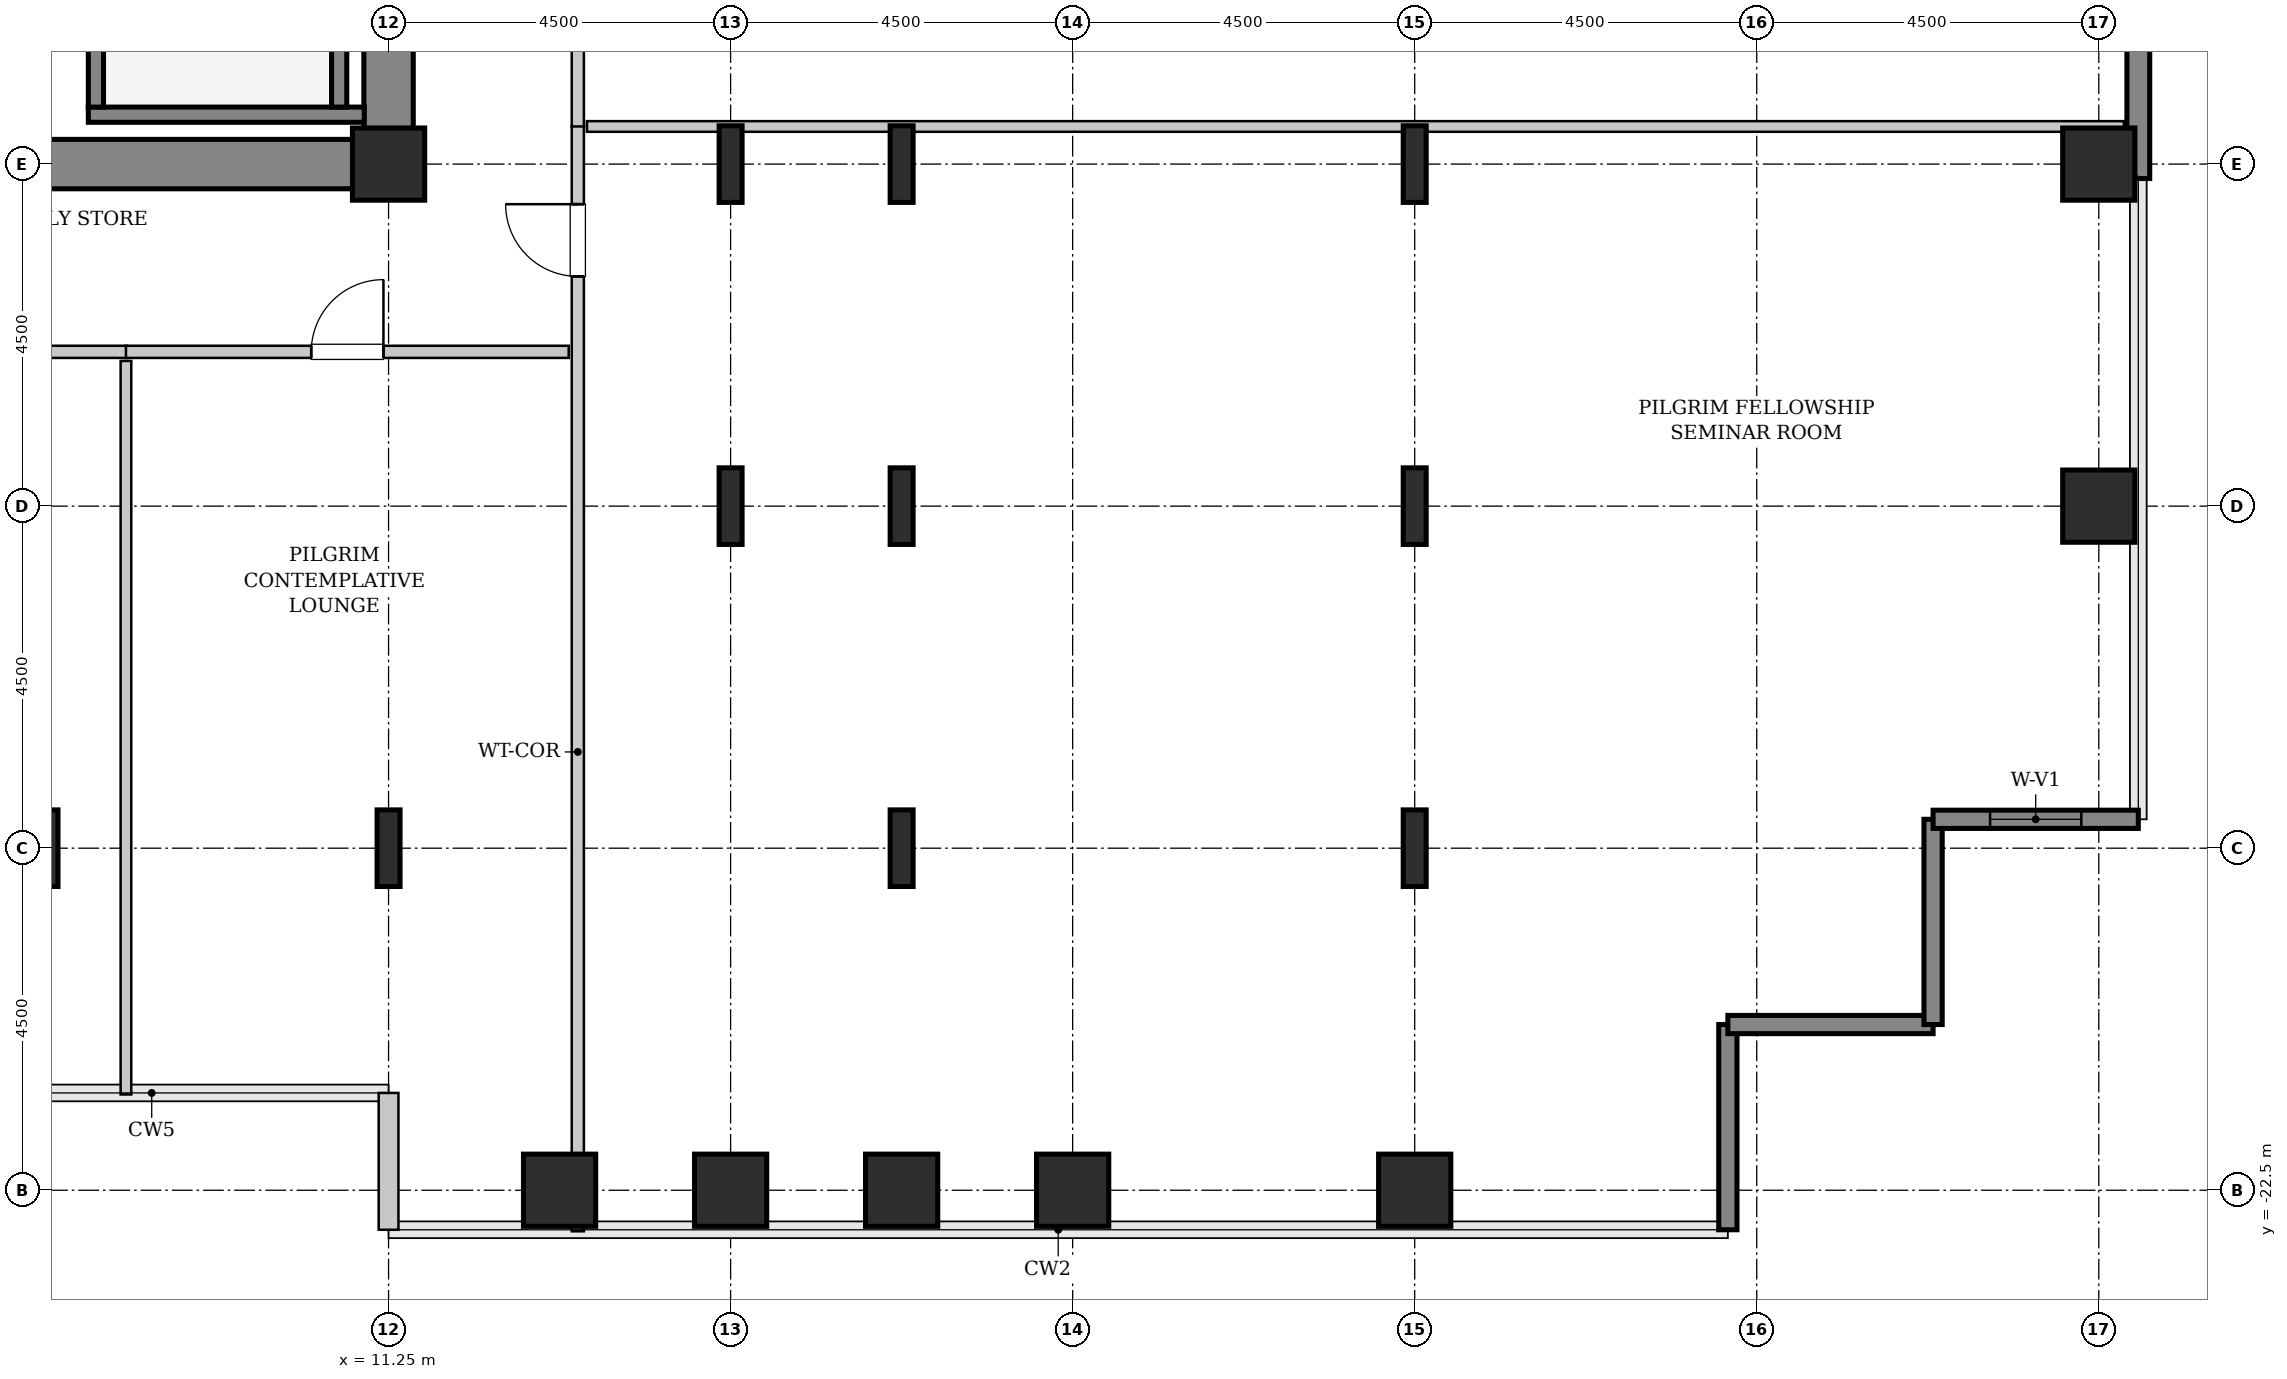
"""IFC4 building model, lengths in metres.
Left out: names, types, materials, properties, quantities, classifications, styles, units other than length and angle.
Written with IfcOpenShell. Run it as: python <this file> out.ifc"""

import sys

from ifc_helpers import new_model, si_unit, direction, frame, frame_2d, origin, origin_2d, place, context, subcontext, project, spatial, rectangle, hollow_rectangle, i_section, extrude, source, transform, mapped, element, fill, save


model = new_model("IFC4")
c1 = context("Model", 3, precision=1e-05, world=origin(), true_north=direction((0.0, 1.0)))
c2 = subcontext(c1, "Body", "Model", "MODEL_VIEW")
j1 = project(units=[si_unit("LENGTHUNIT", "METRE"), si_unit("PLANEANGLEUNIT", "RADIAN")], contexts=[c1])
p1 = place(None, origin())
s1 = spatial("IfcSite", under=j1, at=p1, CompositionType="ELEMENT")
p2 = place(p1, origin())
s2 = spatial("IfcBuilding", under=s1, at=p2, CompositionType="ELEMENT")
p3 = place(p2, frame((0.0, 0.0, 55.8)))
s3 = spatial("IfcBuildingStorey", under=s2, at=p3, CompositionType="ELEMENT", Elevation=55.8)
m1 = source(origin(), c2, "Body", "SweptSolid", [
    extrude(rectangle(XDim=10.025, YDim=0.65, at=frame_2d((5.012, 0.0))), origin(), (0.0, 0.0, 1.0), 3.8),
])
p4 = place(p3, frame((1.55, -9.0, 0.0), z_axis=(0.0, 0.0, 1.0), x_axis=(1.0, 0.0, 0.0)))
e1 = element("IfcWall", 1, at=p4, inside=s3, PredefinedType="SHEAR", context=c2, shape_type="MappedRepresentation", body=[
    mapped(m1, transform((0.0, 0.0, 0.0), x_axis=(1.0, 0.0, 0.0), y_axis=(0.0, 1.0, 0.0), z_axis=(0.0, 0.0, 1.0), scale=1.0)),
])
m2 = source(origin(), c2, "Body", "SweptSolid", [
    extrude(rectangle(XDim=7.325, YDim=0.65, at=frame_2d((3.663, 0.0))), origin(), (0.0, 0.0, 1.0), 3.8),
])
p5 = place(p3, frame((11.25, -8.675, 0.0), z_axis=(0.0, 0.0, 1.0), x_axis=(0.0, 1.0, 0.0)))
e2 = element("IfcWall", 2, at=p5, inside=s3, PredefinedType="SHEAR", context=c2, shape_type="MappedRepresentation", body=[
    mapped(m2, transform((0.0, 0.0, 0.0), x_axis=(1.0, 0.0, 0.0), y_axis=(0.0, 1.0, 0.0), z_axis=(0.0, 0.0, 1.0), scale=1.0)),
])
m3 = source(origin(), c2, "Body", "SweptSolid", [
    extrude(i_section(OverallWidth=0.302, OverallDepth=1.008, WebThickness=0.021, FlangeThickness=0.04, FilletRadius=0.03, at=origin_2d()), origin(), (0.0, 0.0, 1.0), 3.8),
])
for number, where, z_axis, x_axis in (
    (3, (6.75, -18.0, 0.0), (0.0, 0.0, 1.0), (1.0, 0.0, 0.0)),
    (4, (11.25, -18.0, 0.0), (0.0, 0.0, 1.0), (1.0, 0.0, 0.0)),
):
    element("IfcColumn", number, at=place(p3, frame(where, z_axis=z_axis, x_axis=x_axis)), inside=s3, PredefinedType="COLUMN", context=c2, shape_type="MappedRepresentation", body=[
        mapped(m3, transform((0.0, 0.0, 0.0), x_axis=(1.0, 0.0, 0.0), y_axis=(0.0, 1.0, 0.0), z_axis=(0.0, 0.0, 1.0), scale=1.0)),
    ])
m4 = source(origin(), c2, "Body", "SweptSolid", [
    extrude(hollow_rectangle(XDim=0.95, YDim=0.95, WallThickness=0.045, InnerFilletRadius=0.045, OuterFilletRadius=0.09, at=origin_2d()), origin(), (0.0, 0.0, 1.0), 3.8),
])
p6 = place(p3, frame((11.25, -9.0, 0.0), z_axis=(0.0, 0.0, 1.0), x_axis=(1.0, 0.0, 0.0)))
e5 = element("IfcColumn", 5, at=p6, inside=s3, PredefinedType="COLUMN", context=c2, shape_type="MappedRepresentation", body=[
    mapped(m4, transform((0.0, 0.0, 0.0), x_axis=(1.0, 0.0, 0.0), y_axis=(0.0, 1.0, 0.0), z_axis=(0.0, 0.0, 1.0), scale=1.0)),
])
m5 = source(origin(), c2, "Body", "SweptSolid", [
    extrude(hollow_rectangle(XDim=0.95, YDim=0.95, WallThickness=0.045, InnerFilletRadius=0.045, OuterFilletRadius=0.09, at=origin_2d()), origin(), (0.0, 0.0, 1.0), 3.8),
])
for number, where, z_axis, x_axis in (
    (6, (13.5, -22.5, 0.0), (0.0, 0.0, 1.0), (1.0, 0.0, 0.0)),
    (7, (15.75, -22.5, 0.0), (0.0, 0.0, 1.0), (1.0, 0.0, 0.0)),
):
    element("IfcColumn", number, at=place(p3, frame(where, z_axis=z_axis, x_axis=x_axis)), inside=s3, PredefinedType="COLUMN", context=c2, shape_type="MappedRepresentation", body=[
        mapped(m5, transform((0.0, 0.0, 0.0), x_axis=(1.0, 0.0, 0.0), y_axis=(0.0, 1.0, 0.0), z_axis=(0.0, 0.0, 1.0), scale=1.0)),
    ])
for number, where, z_axis, x_axis in (
    (8, (15.75, -13.5, 0.0), (0.0, 0.0, 1.0), (1.0, 0.0, 0.0)),
    (9, (15.75, -9.0, 0.0), (0.0, 0.0, 1.0), (1.0, 0.0, 0.0)),
):
    element("IfcColumn", number, at=place(p3, frame(where, z_axis=z_axis, x_axis=x_axis)), inside=s3, PredefinedType="COLUMN", context=c2, shape_type="MappedRepresentation", body=[
        mapped(m3, transform((0.0, 0.0, 0.0), x_axis=(1.0, 0.0, 0.0), y_axis=(0.0, 1.0, 0.0), z_axis=(0.0, 0.0, 1.0), scale=1.0)),
    ])
p7 = place(p3, frame((18.0, -22.5, 0.0), z_axis=(0.0, 0.0, 1.0), x_axis=(1.0, 0.0, 0.0)))
e10 = element("IfcColumn", 10, at=p7, inside=s3, PredefinedType="COLUMN", context=c2, shape_type="MappedRepresentation", body=[
    mapped(m5, transform((0.0, 0.0, 0.0), x_axis=(1.0, 0.0, 0.0), y_axis=(0.0, 1.0, 0.0), z_axis=(0.0, 0.0, 1.0), scale=1.0)),
])
for number, where, z_axis, x_axis in (
    (11, (18.0, -18.0, 0.0), (0.0, 0.0, 1.0), (1.0, 0.0, 0.0)),
    (12, (18.0, -13.5, 0.0), (0.0, 0.0, 1.0), (1.0, 0.0, 0.0)),
    (13, (18.0, -9.0, 0.0), (0.0, 0.0, 1.0), (1.0, 0.0, 0.0)),
):
    element("IfcColumn", number, at=place(p3, frame(where, z_axis=z_axis, x_axis=x_axis)), inside=s3, PredefinedType="COLUMN", context=c2, shape_type="MappedRepresentation", body=[
        mapped(m3, transform((0.0, 0.0, 0.0), x_axis=(1.0, 0.0, 0.0), y_axis=(0.0, 1.0, 0.0), z_axis=(0.0, 0.0, 1.0), scale=1.0)),
    ])
for number, where, z_axis, x_axis in (
    (14, (20.25, -22.5, 0.0), (0.0, 0.0, 1.0), (1.0, 0.0, 0.0)),
    (15, (24.75, -22.5, 0.0), (0.0, 0.0, 1.0), (1.0, 0.0, 0.0)),
):
    element("IfcColumn", number, at=place(p3, frame(where, z_axis=z_axis, x_axis=x_axis)), inside=s3, PredefinedType="COLUMN", context=c2, shape_type="MappedRepresentation", body=[
        mapped(m5, transform((0.0, 0.0, 0.0), x_axis=(1.0, 0.0, 0.0), y_axis=(0.0, 1.0, 0.0), z_axis=(0.0, 0.0, 1.0), scale=1.0)),
    ])
for number, where, z_axis, x_axis in (
    (16, (24.75, -18.0, 0.0), (0.0, 0.0, 1.0), (1.0, 0.0, 0.0)),
    (17, (24.75, -13.5, 0.0), (0.0, 0.0, 1.0), (1.0, 0.0, 0.0)),
    (18, (24.75, -9.0, 0.0), (0.0, 0.0, 1.0), (1.0, 0.0, 0.0)),
):
    element("IfcColumn", number, at=place(p3, frame(where, z_axis=z_axis, x_axis=x_axis)), inside=s3, PredefinedType="COLUMN", context=c2, shape_type="MappedRepresentation", body=[
        mapped(m3, transform((0.0, 0.0, 0.0), x_axis=(1.0, 0.0, 0.0), y_axis=(0.0, 1.0, 0.0), z_axis=(0.0, 0.0, 1.0), scale=1.0)),
    ])
for number, where, z_axis, x_axis in (
    (19, (33.75, -13.5, 0.0), (0.0, 0.0, 1.0), (1.0, 0.0, 0.0)),
    (20, (33.75, -9.0, 0.0), (0.0, 0.0, 1.0), (1.0, 0.0, 0.0)),
):
    element("IfcColumn", number, at=place(p3, frame(where, z_axis=z_axis, x_axis=x_axis)), inside=s3, PredefinedType="COLUMN", context=c2, shape_type="MappedRepresentation", body=[
        mapped(m5, transform((0.0, 0.0, 0.0), x_axis=(1.0, 0.0, 0.0), y_axis=(0.0, 1.0, 0.0), z_axis=(0.0, 0.0, 1.0), scale=1.0)),
    ])
m6 = source(origin(), c2, "Body", "SweptSolid", [
    extrude(rectangle(XDim=4.88, YDim=0.3, at=frame_2d((2.44, 0.0))), origin(), (0.0, 0.0, 1.0), 3.55),
])
p8 = place(p3, frame((34.27, -9.19, 0.0), z_axis=(0.0, 0.0, 1.0), x_axis=(0.0, 1.0, 0.0)))
e21 = element("IfcWall", 21, at=p8, inside=s3, PredefinedType="SHEAR", context=c2, shape_type="MappedRepresentation", body=[
    mapped(m6, transform((0.0, 0.0, 0.0), x_axis=(1.0, 0.0, 0.0), y_axis=(0.0, 1.0, 0.0), z_axis=(0.0, 0.0, 1.0), scale=1.0)),
])
m7 = source(origin(), c2, "Body", "SweptSolid", [
    extrude(rectangle(XDim=1.8, YDim=0.26, at=frame_2d((0.9, 0.0))), origin(), (0.0, 0.0, 1.0), 3.55),
])
p9 = place(p3, frame((11.25, -21.22, 0.0), z_axis=(0.0, 0.0, 1.0), x_axis=(0.0, -1.0, 0.0)))
e22 = element("IfcWall", 22, at=p9, inside=s3, PredefinedType="SOLIDWALL", context=c2, shape_type="MappedRepresentation", body=[
    mapped(m7, transform((0.0, 0.0, 0.0), x_axis=(1.0, 0.0, 0.0), y_axis=(0.0, 1.0, 0.0), z_axis=(0.0, 0.0, 1.0), scale=1.0)),
])
m8 = source(origin(), c2, "Body", "SweptSolid", [
    extrude(rectangle(XDim=2.7, YDim=0.24, at=frame_2d((1.35, 0.0))), origin(), (0.0, 0.0, 1.0), 3.55),
])
for number, where, z_axis, x_axis in (
    (23, (28.87, -23.02, 0.0), (0.0, 0.0, 1.0), (0.0, 1.0, 0.0)),
    (24, (28.87, -20.32, 0.0), (0.0, 0.0, 1.0), (1.0, 0.0, 0.0)),
    (25, (31.57, -20.32, 0.0), (0.0, 0.0, 1.0), (0.0, 1.0, 0.0)),
):
    element("IfcWall", number, at=place(p3, frame(where, z_axis=z_axis, x_axis=x_axis)), inside=s3, PredefinedType="SHEAR", context=c2, shape_type="MappedRepresentation", body=[
        mapped(m8, transform((0.0, 0.0, 0.0), x_axis=(1.0, 0.0, 0.0), y_axis=(0.0, 1.0, 0.0), z_axis=(0.0, 0.0, 1.0), scale=1.0)),
    ])
p10 = place(p3, frame((31.57, -17.62, 0.0), z_axis=(0.0, 0.0, 1.0), x_axis=(1.0, 0.0, 0.0)))
e26 = element("IfcWall", 26, at=p10, inside=s3, PredefinedType="SHEAR", context=c2, shape_type="MappedRepresentation", body=[
    mapped(m8, transform((0.0, 0.0, 0.0), x_axis=(1.0, 0.0, 0.0), y_axis=(0.0, 1.0, 0.0), z_axis=(0.0, 0.0, 1.0), scale=1.0)),
])
p11 = place(p10, frame((0.75, 0.0, 0.85)))
e27 = element("IfcOpeningElement", 27, at=p11, cuts=e26, PredefinedType="OPENING", context=c2, shape_type="SweptSolid", body=[
    extrude(rectangle(XDim=1.2, YDim=1.8, at=frame_2d((0.6, 0.9))), frame((0.0, 0.13, 0.0), z_axis=(0.0, -1.0, 0.0), x_axis=(1.0, 0.0, 0.0)), (0.0, 0.0, 1.0), 0.26),
])
m9 = source(origin(), c2, "Body", "SweptSolid", [
    extrude(rectangle(XDim=3.63, YDim=0.2, at=frame_2d((1.815, 0.0))), origin(), (0.0, 0.0, 1.0), 3.8),
])
p12 = place(p3, frame((7.3, -8.35, 0.0), z_axis=(0.0, 0.0, 1.0), x_axis=(1.0, 0.0, 0.0)))
e28 = element("IfcWall", 28, at=p12, inside=s3, PredefinedType="SOLIDWALL", context=c2, shape_type="MappedRepresentation", body=[
    mapped(m9, transform((0.0, 0.0, 0.0), x_axis=(1.0, 0.0, 0.0), y_axis=(0.0, 1.0, 0.0), z_axis=(0.0, 0.0, 1.0), scale=1.0)),
])
m10 = source(origin(), c2, "Body", "SweptSolid", [
    extrude(rectangle(XDim=7.1, YDim=0.2, at=frame_2d((3.55, 0.0))), origin(), (0.0, 0.0, 1.0), 3.8),
])
p13 = place(p3, frame((7.4, -1.15, 0.0), z_axis=(0.0, 0.0, 1.0), x_axis=(0.0, -1.0, 0.0)))
e29 = element("IfcWall", 29, at=p13, inside=s3, PredefinedType="SOLIDWALL", context=c2, shape_type="MappedRepresentation", body=[
    mapped(m10, transform((0.0, 0.0, 0.0), x_axis=(1.0, 0.0, 0.0), y_axis=(0.0, 1.0, 0.0), z_axis=(0.0, 0.0, 1.0), scale=1.0)),
])
p14 = place(p13, frame((0.18, 0.0, 0.0)))
e30 = element("IfcOpeningElement", 30, at=p14, cuts=e29, PredefinedType="OPENING", context=c2, shape_type="SweptSolid", body=[
    extrude(rectangle(XDim=1.1, YDim=2.15, at=frame_2d((0.55, 1.075))), frame((0.0, 0.11, 0.0), z_axis=(0.0, -1.0, 0.0), x_axis=(1.0, 0.0, 0.0)), (0.0, 0.0, 1.0), 0.22),
])
p15 = place(p3, frame((10.6, -1.15, 0.0), z_axis=(0.0, 0.0, 1.0), x_axis=(0.0, -1.0, 0.0)))
e31 = element("IfcWall", 31, at=p15, inside=s3, PredefinedType="SOLIDWALL", context=c2, shape_type="MappedRepresentation", body=[
    mapped(m10, transform((0.0, 0.0, 0.0), x_axis=(1.0, 0.0, 0.0), y_axis=(0.0, 1.0, 0.0), z_axis=(0.0, 0.0, 1.0), scale=1.0)),
])
m11 = source(origin(), c2, "Body", "SweptSolid", [
    extrude(rectangle(XDim=14.545, YDim=0.16, at=frame_2d((7.272, 0.0))), origin(), (0.0, 0.0, 1.0), 3.535),
])
p16 = place(p3, frame((13.74, -23.04, 0.0), z_axis=(0.0, 0.0, 1.0), x_axis=(0.0, 1.0, 0.0)))
e32 = element("IfcWall", 32, at=p16, inside=s3, PredefinedType="PARTITIONING", context=c2, shape_type="MappedRepresentation", body=[
    mapped(m11, transform((0.0, 0.0, 0.0), x_axis=(1.0, 0.0, 0.0), y_axis=(0.0, 1.0, 0.0), z_axis=(0.0, 0.0, 1.0), scale=1.0)),
])
p17 = place(p16, frame((12.562, 0.0, 0.0)))
e33 = element("IfcOpeningElement", 33, at=p17, cuts=e32, PredefinedType="OPENING", context=c2, shape_type="SweptSolid", body=[
    extrude(rectangle(XDim=0.95, YDim=2.1, at=frame_2d((0.475, 1.05))), frame((0.0, 0.09, 0.0), z_axis=(0.0, -1.0, 0.0), x_axis=(1.0, 0.0, 0.0)), (0.0, 0.0, 1.0), 0.18),
])
m12 = source(origin(), c2, "Body", "SweptSolid", [
    extrude(rectangle(XDim=20.22, YDim=0.14, at=frame_2d((10.11, 0.0))), origin(), (0.0, 0.0, 1.0), 2.825),
])
p18 = place(p3, frame((13.86, -8.505, 0.0), z_axis=(0.0, 0.0, 1.0), x_axis=(1.0, 0.0, 0.0)))
e34 = element("IfcWall", 34, at=p18, inside=s3, PredefinedType="PARTITIONING", context=c2, shape_type="MappedRepresentation", body=[
    mapped(m12, transform((0.0, 0.0, 0.0), x_axis=(1.0, 0.0, 0.0), y_axis=(0.0, 1.0, 0.0), z_axis=(0.0, 0.0, 1.0), scale=1.0)),
])
m13 = source(origin(), c2, "Body", "SweptSolid", [
    extrude(rectangle(XDim=3.31, YDim=0.16, at=frame_2d((1.655, 0.0))), origin(), (0.0, 0.0, 1.0), 3.535),
])
p19 = place(p3, frame((13.74, -8.505, 0.0), z_axis=(0.0, 0.0, 1.0), x_axis=(0.0, 1.0, 0.0)))
e35 = element("IfcWall", 35, at=p19, inside=s3, PredefinedType="PARTITIONING", context=c2, shape_type="MappedRepresentation", body=[
    mapped(m13, transform((0.0, 0.0, 0.0), x_axis=(1.0, 0.0, 0.0), y_axis=(0.0, 1.0, 0.0), z_axis=(0.0, 0.0, 1.0), scale=1.0)),
])
p20 = place(p19, frame((1.18, 0.0, 0.0)))
e36 = element("IfcOpeningElement", 36, at=p20, cuts=e35, PredefinedType="OPENING", context=c2, shape_type="SweptSolid", body=[
    extrude(rectangle(XDim=0.95, YDim=2.1, at=frame_2d((0.475, 1.05))), frame((0.0, 0.09, 0.0), z_axis=(0.0, -1.0, 0.0), x_axis=(1.0, 0.0, 0.0)), (0.0, 0.0, 1.0), 0.18),
])
m14 = source(origin(), c2, "Body", "SweptSolid", [
    extrude(rectangle(XDim=6.01, YDim=0.16, at=frame_2d((3.005, 0.0))), origin(), (0.0, 0.0, 1.0), 3.535),
])
p21 = place(p3, frame((1.795, -11.47, 0.0), z_axis=(0.0, 0.0, 1.0), x_axis=(1.0, 0.0, 0.0)))
e37 = element("IfcWall", 37, at=p21, inside=s3, PredefinedType="PARTITIONING", context=c2, shape_type="MappedRepresentation", body=[
    mapped(m14, transform((0.0, 0.0, 0.0), x_axis=(1.0, 0.0, 0.0), y_axis=(0.0, 1.0, 0.0), z_axis=(0.0, 0.0, 1.0), scale=1.0)),
])
p22 = place(p21, frame((2.53, 0.0, 0.0)))
e38 = element("IfcOpeningElement", 38, at=p22, cuts=e37, PredefinedType="OPENING", context=c2, shape_type="SweptSolid", body=[
    extrude(rectangle(XDim=0.95, YDim=2.1, at=frame_2d((0.475, 1.05))), frame((0.0, 0.09, 0.0), z_axis=(0.0, -1.0, 0.0), x_axis=(1.0, 0.0, 0.0)), (0.0, 0.0, 1.0), 0.18),
])
m15 = source(origin(), c2, "Body", "SweptSolid", [
    extrude(rectangle(XDim=9.65, YDim=0.14, at=frame_2d((4.825, 0.0))), origin(), (0.0, 0.0, 1.0), 3.535),
])
p23 = place(p3, frame((7.795, -21.24, 0.0), z_axis=(0.0, 0.0, 1.0), x_axis=(0.0, 1.0, 0.0)))
e39 = element("IfcWall", 39, at=p23, inside=s3, PredefinedType="PARTITIONING", context=c2, shape_type="MappedRepresentation", body=[
    mapped(m15, transform((0.0, 0.0, 0.0), x_axis=(1.0, 0.0, 0.0), y_axis=(0.0, 1.0, 0.0), z_axis=(0.0, 0.0, 1.0), scale=1.0)),
])
m16 = source(origin(), c2, "Body", "SweptSolid", [
    extrude(rectangle(XDim=5.825, YDim=0.16, at=frame_2d((2.913, 0.0))), origin(), (0.0, 0.0, 1.0), 3.535),
])
p24 = place(p3, frame((7.795, -11.47, 0.0), z_axis=(0.0, 0.0, 1.0), x_axis=(1.0, 0.0, 0.0)))
e40 = element("IfcWall", 40, at=p24, inside=s3, PredefinedType="PARTITIONING", context=c2, shape_type="MappedRepresentation", body=[
    mapped(m16, transform((0.0, 0.0, 0.0), x_axis=(1.0, 0.0, 0.0), y_axis=(0.0, 1.0, 0.0), z_axis=(0.0, 0.0, 1.0), scale=1.0)),
])
p25 = place(p24, frame((2.438, 0.0, 0.0)))
e41 = element("IfcOpeningElement", 41, at=p25, cuts=e40, PredefinedType="OPENING", context=c2, shape_type="SweptSolid", body=[
    extrude(rectangle(XDim=0.95, YDim=2.1, at=frame_2d((0.475, 1.05))), frame((0.0, 0.09, 0.0), z_axis=(0.0, -1.0, 0.0), x_axis=(1.0, 0.0, 0.0)), (0.0, 0.0, 1.0), 0.18),
])
m17 = source(origin(), c2, "Body", "SweptSolid", [
    extrude(rectangle(XDim=1.2, YDim=1.8, at=frame_2d((0.6, 0.9))), frame((0.0, 0.03, 0.0), z_axis=(0.0, -1.0, 0.0), x_axis=(1.0, 0.0, 0.0)), (0.0, 0.0, 1.0), 0.06),
])
p26 = place(p11, origin())
e42 = element("IfcWindow", 42, at=p26, inside=s3, PartitioningType="SINGLE_PANEL", PredefinedType="WINDOW", context=c2, shape_type="MappedRepresentation", body=[
    mapped(m17, transform((0.0, 0.0, 0.0), x_axis=(1.0, 0.0, 0.0), y_axis=(0.0, 1.0, 0.0), z_axis=(0.0, 0.0, 1.0), scale=1.0)),
])
fill(e27, e42)
m18 = source(origin(), c2, "Body", "SweptSolid", [
    extrude(rectangle(XDim=0.95, YDim=2.1, at=frame_2d((0.475, 1.05))), frame((0.0, 0.025, 0.0), z_axis=(0.0, -1.0, 0.0), x_axis=(1.0, 0.0, 0.0)), (0.0, 0.0, 1.0), 0.05),
])
p27 = place(p17, origin())
e43 = element("IfcDoor", 43, at=p27, inside=s3, OperationType="SINGLE_SWING_RIGHT", PredefinedType="DOOR", context=c2, shape_type="MappedRepresentation", body=[
    mapped(m18, transform((0.0, 0.0, 0.0), x_axis=(1.0, 0.0, 0.0), y_axis=(0.0, 1.0, 0.0), z_axis=(0.0, 0.0, 1.0), scale=1.0)),
])
fill(e33, e43)
p28 = place(p25, origin())
e44 = element("IfcDoor", 44, at=p28, inside=s3, OperationType="SINGLE_SWING_RIGHT", PredefinedType="DOOR", context=c2, shape_type="MappedRepresentation", body=[
    mapped(m18, transform((0.0, 0.0, 0.0), x_axis=(1.0, 0.0, 0.0), y_axis=(0.0, 1.0, 0.0), z_axis=(0.0, 0.0, 1.0), scale=1.0)),
])
fill(e41, e44)
save(model, sys.argv[1])
